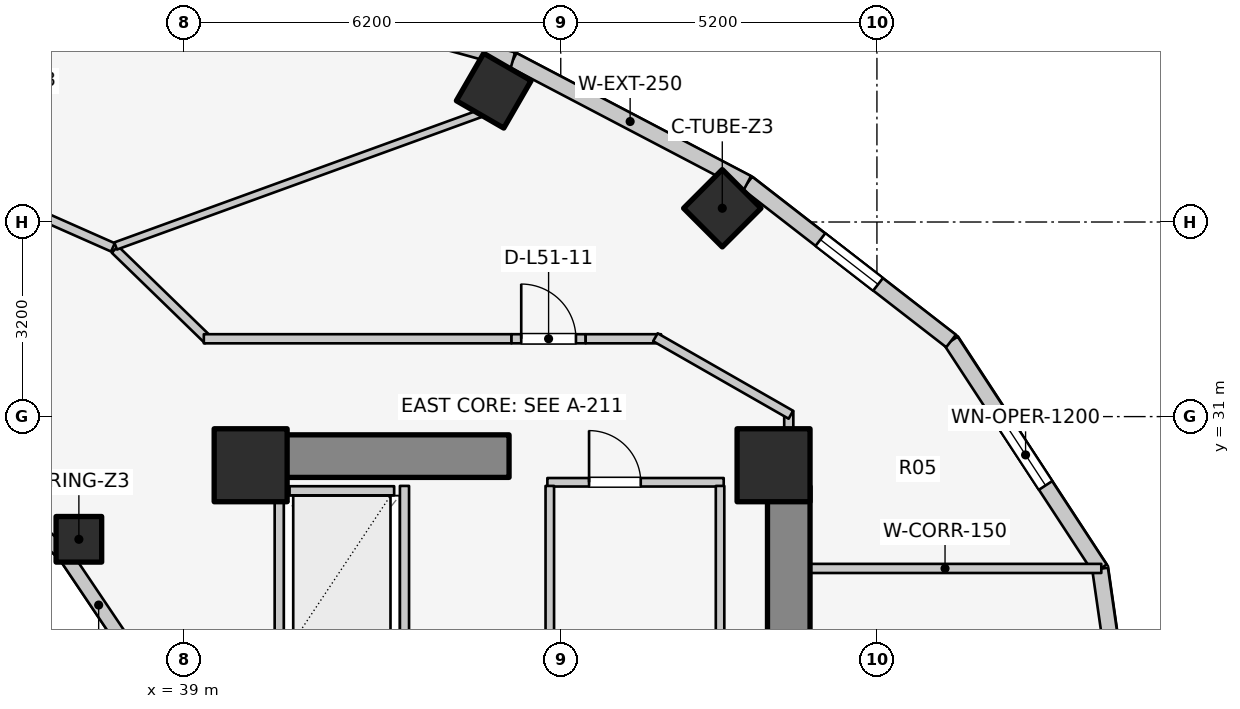
"""IFC4 building model, lengths in metres.
Left out: names, types, materials, properties, quantities, classifications, styles, units other than length and angle.
Written with IfcOpenShell. Run it as: python <this file> out.ifc"""

import sys

from ifc_helpers import new_model, si_unit, direction, frame, frame_2d, origin, origin_2d, place, context, subcontext, project, spatial, rectangle, extrude, element, fill, save


model = new_model("IFC4")
c1 = context("Model", 3, precision=1e-05, world=origin(), true_north=direction((0.0, 1.0)))
c2 = subcontext(c1, "Body", "Model", "MODEL_VIEW")
j1 = project(units=[si_unit("LENGTHUNIT", "METRE"), si_unit("PLANEANGLEUNIT", "RADIAN")], contexts=[c1])
p1 = place(None, origin())
s1 = spatial("IfcSite", under=j1, at=p1, CompositionType="ELEMENT")
p2 = place(p1, origin())
s2 = spatial("IfcBuilding", under=s1, at=p2, CompositionType="ELEMENT")
p3 = place(p2, frame((0.0, 0.0, 168.4)))
s3 = spatial("IfcBuildingStorey", under=s2, at=p3, CompositionType="ELEMENT", Elevation=168.4)
p4 = place(p3, frame((48.95, 17.05, 0.0), z_axis=(0.0, 0.0, 1.0), x_axis=(0.0, 1.0, 0.0)))
e1 = element("IfcWall", 1, at=p4, inside=s3, PredefinedType="SHEAR", context=c2, shape_type="SweptSolid", body=[
    extrude(rectangle(XDim=12.8, YDim=0.7, at=frame_2d((6.4, 0.0))), origin(), (0.0, 0.0, 1.0), 3.1),
])
p5 = place(p3, frame((39.85, 30.35, 0.0), z_axis=(0.0, 0.0, 1.0), x_axis=(1.0, 0.0, 0.0)))
e2 = element("IfcWall", 2, at=p5, inside=s3, PredefinedType="SHEAR", context=c2, shape_type="SweptSolid", body=[
    extrude(rectangle(XDim=4.5, YDim=0.7, at=frame_2d((2.25, 0.0))), origin(), (0.0, 0.0, 1.0), 3.1),
])
for number, where, z_axis, x_axis in (
    (3, (48.7, 30.2, 0.0), (0.0, 0.0, 1.0), (1.0, 0.0, 0.0)),
    (4, (40.1, 30.2, 0.0), (0.0, 0.0, 1.0), (1.0, 0.0, 0.0)),
):
    element("IfcColumn", number, at=place(p3, frame(where, z_axis=z_axis, x_axis=x_axis)), inside=s3, PredefinedType="COLUMN", context=c2, shape_type="SweptSolid", body=[
        extrude(rectangle(XDim=1.2, YDim=1.2, at=origin_2d()), origin(), (0.0, 0.0, 1.0), 3.1),
    ])
p6 = place(p3, frame((37.275, 28.982, 0.0), z_axis=(0.0, 0.0, 1.0), x_axis=(1.0, 0.0, 0.0)))
e5 = element("IfcColumn", 5, at=p6, inside=s3, PredefinedType="COLUMN", context=c2, shape_type="SweptSolid", body=[
    extrude(rectangle(XDim=0.75, YDim=0.75, at=origin_2d()), origin(), (0.0, 0.0, 1.0), 3.1),
])
for number, where, z_axis, x_axis in (
    (6, (47.857, 34.427, 0.0), (0.0, 0.0, 1.0), (0.707, 0.707, 0.0)),
    (7, (44.098, 36.359, 0.0), (0.0, 0.0, 1.0), (0.5, 0.866, 0.0)),
):
    element("IfcColumn", number, at=place(p3, frame(where, z_axis=z_axis, x_axis=x_axis)), inside=s3, PredefinedType="COLUMN", context=c2, shape_type="SweptSolid", body=[
        extrude(rectangle(XDim=0.9, YDim=0.9, at=origin_2d()), origin(), (0.0, 0.0, 1.0), 3.1),
    ])
p7 = place(p3, frame((38.166, 27.06, 0.0), z_axis=(0.0, 0.0, 1.0), x_axis=(-0.558197800898, 0.829707909492, 0.0)))
e8 = element("IfcWall", 8, at=p7, inside=s3, PredefinedType="STANDARD", context=c2, shape_type="SweptSolid", body=[
    extrude(rectangle(XDim=2.027, YDim=0.23, at=frame_2d((1.013, 0.0))), origin(), (0.0, 0.0, 1.0), 1.22),
])
p8 = place(p3, frame((37.035, 28.742, 0.0), z_axis=(0.0, 0.0, 1.0), x_axis=(-0.752576694707, 0.658504607869, 0.0)))
e9 = element("IfcWall", 9, at=p8, inside=s3, PredefinedType="STANDARD", context=c2, shape_type="SweptSolid", body=[
    extrude(rectangle(XDim=1.959, YDim=0.23, at=frame_2d((0.98, 0.0))), origin(), (0.0, 0.0, 1.0), 1.22),
])
p9 = place(p3, frame((54.86, 23.0, 0.0), z_axis=(0.0, 0.0, 1.0), x_axis=(-0.142227632286, 0.989833976288, 0.0)))
e10 = element("IfcWall", 10, at=p9, inside=s3, PredefinedType="STANDARD", context=c2, shape_type="SweptSolid", body=[
    extrude(rectangle(XDim=5.553, YDim=0.26, at=frame_2d((2.776, 0.0))), origin(), (0.0, 0.0, 1.0), 2.57),
])
p10 = place(p9, frame((2.027, 0.0, 0.75)))
e11 = element("IfcOpeningElement", 11, at=p10, cuts=e10, PredefinedType="OPENING", context=c2, shape_type="SweptSolid", body=[
    extrude(rectangle(XDim=1.5, YDim=1.6, at=frame_2d((0.75, 0.8))), frame((0.0, 0.14, 0.0), z_axis=(0.0, -1.0, 0.0), x_axis=(1.0, 0.0, 0.0)), (0.0, 0.0, 1.0), 0.28),
])
p11 = place(p3, frame((54.07, 28.497, 0.0), z_axis=(0.0, 0.0, 1.0), x_axis=(-0.547456494366, 0.836834145322, 0.0)))
e12 = element("IfcWall", 12, at=p11, inside=s3, PredefinedType="STANDARD", context=c2, shape_type="SweptSolid", body=[
    extrude(rectangle(XDim=4.477, YDim=0.26, at=frame_2d((2.239, 0.0))), origin(), (0.0, 0.0, 1.0), 1.22),
])
p12 = place(p11, frame((1.639, 0.0, 0.15)))
e13 = element("IfcOpeningElement", 13, at=p12, cuts=e12, PredefinedType="OPENING", context=c2, shape_type="SweptSolid", body=[
    extrude(rectangle(XDim=1.2, YDim=0.9, at=frame_2d((0.6, 0.45))), frame((0.0, 0.14, 0.0), z_axis=(0.0, -1.0, 0.0), x_axis=(1.0, 0.0, 0.0)), (0.0, 0.0, 1.0), 0.28),
])
p13 = place(p3, frame((51.619, 32.243, 0.0), z_axis=(0.0, 0.0, 1.0), x_axis=(-0.790185650662, 0.612867552973, 0.0)))
e14 = element("IfcWall", 14, at=p13, inside=s3, PredefinedType="STANDARD", context=c2, shape_type="SweptSolid", body=[
    extrude(rectangle(XDim=4.239, YDim=0.26, at=frame_2d((2.12, 0.0))), origin(), (0.0, 0.0, 1.0), 1.22),
])
p14 = place(p13, frame((1.52, 0.0, 0.15)))
e15 = element("IfcOpeningElement", 15, at=p14, cuts=e14, PredefinedType="OPENING", context=c2, shape_type="SweptSolid", body=[
    extrude(rectangle(XDim=1.2, YDim=0.9, at=frame_2d((0.6, 0.45))), frame((0.0, 0.14, 0.0), z_axis=(0.0, -1.0, 0.0), x_axis=(1.0, 0.0, 0.0)), (0.0, 0.0, 1.0), 0.28),
])
p15 = place(p3, frame((48.269, 34.842, 0.0), z_axis=(0.0, 0.0, 1.0), x_axis=(-0.885660265226, 0.464333818065, 0.0)))
e16 = element("IfcWall", 16, at=p15, inside=s3, PredefinedType="STANDARD", context=c2, shape_type="SweptSolid", body=[
    extrude(rectangle(XDim=4.354, YDim=0.26, at=frame_2d((2.177, 0.0))), origin(), (0.0, 0.0, 1.0), 1.22),
])
p16 = place(p3, frame((44.413, 36.863, 0.0), z_axis=(0.0, 0.0, 1.0), x_axis=(-0.963953455704, 0.26607092144, 0.0)))
e17 = element("IfcWall", 17, at=p16, inside=s3, PredefinedType="STANDARD", context=c2, shape_type="SweptSolid", body=[
    extrude(rectangle(XDim=5.237, YDim=0.26, at=frame_2d((2.618, 0.0))), origin(), (0.0, 0.0, 1.0), 1.22),
])
p17 = place(p16, frame((2.018, 0.0, 0.15)))
e18 = element("IfcOpeningElement", 18, at=p17, cuts=e17, PredefinedType="OPENING", context=c2, shape_type="SweptSolid", body=[
    extrude(rectangle(XDim=1.2, YDim=0.9, at=frame_2d((0.6, 0.45))), frame((0.0, 0.14, 0.0), z_axis=(0.0, -1.0, 0.0), x_axis=(1.0, 0.0, 0.0)), (0.0, 0.0, 1.0), 0.28),
])
p18 = place(p3, frame((40.74, 29.78, 0.0), z_axis=(0.0, 0.0, 1.0), x_axis=(1.0, 0.0, 0.0)))
e19 = element("IfcWall", 19, at=p18, inside=s3, PredefinedType="SOLIDWALL", context=c2, shape_type="SweptSolid", body=[
    extrude(rectangle(XDim=1.72, YDim=0.15, at=frame_2d((0.86, 0.0))), origin(), (0.0, 0.0, 1.0), 2.575),
])
for number, where, z_axis, x_axis in (
    (20, (40.57, 27.14, 0.0), (0.0, 0.0, 1.0), (0.0, 1.0, 0.0)),
    (21, (42.63, 27.14, 0.0), (0.0, 0.0, 1.0), (0.0, 1.0, 0.0)),
):
    element("IfcWall", number, at=place(p3, frame(where, z_axis=z_axis, x_axis=x_axis)), inside=s3, PredefinedType="SOLIDWALL", context=c2, shape_type="SweptSolid", body=[
        extrude(rectangle(XDim=2.72, YDim=0.15, at=frame_2d((1.36, 0.0))), origin(), (0.0, 0.0, 1.0), 2.575),
    ])
p19 = place(p3, frame((44.98, 29.92, 0.0), z_axis=(0.0, 0.0, 1.0), x_axis=(1.0, 0.0, 0.0)))
e22 = element("IfcWall", 22, at=p19, inside=s3, PredefinedType="PLUMBINGWALL", context=c2, shape_type="SweptSolid", body=[
    extrude(rectangle(XDim=2.9, YDim=0.14, at=frame_2d((1.45, 0.0))), origin(), (0.0, 0.0, 1.0), 2.575),
])
p20 = place(p19, frame((0.686, 0.0, 0.0)))
e23 = element("IfcOpeningElement", 23, at=p20, cuts=e22, PredefinedType="OPENING", context=c2, shape_type="SweptSolid", body=[
    extrude(rectangle(XDim=0.85, YDim=2.05, at=frame_2d((0.425, 1.025))), frame((0.0, 0.08, 0.0), z_axis=(0.0, -1.0, 0.0), x_axis=(1.0, 0.0, 0.0)), (0.0, 0.0, 1.0), 0.16),
])
for number, where, z_axis, x_axis in (
    (24, (45.02, 25.98, 0.0), (0.0, 0.0, 1.0), (0.0, 1.0, 0.0)),
    (25, (47.82, 25.98, 0.0), (0.0, 0.0, 1.0), (0.0, 1.0, 0.0)),
):
    element("IfcWall", number, at=place(p3, frame(where, z_axis=z_axis, x_axis=x_axis)), inside=s3, PredefinedType="PLUMBINGWALL", context=c2, shape_type="SweptSolid", body=[
        extrude(rectangle(XDim=3.88, YDim=0.14, at=frame_2d((1.94, 0.0))), origin(), (0.0, 0.0, 1.0), 2.575),
    ])
p21 = place(p3, frame((48.95, 28.503, 0.0), z_axis=(0.0, 0.0, 1.0), x_axis=(1.0, 0.0, 0.0)))
e26 = element("IfcWall", 26, at=p21, inside=s3, PredefinedType="PARTITIONING", context=c2, shape_type="SweptSolid", body=[
    extrude(rectangle(XDim=5.14, YDim=0.15, at=frame_2d((2.57, 0.0))), origin(), (0.0, 0.0, 1.0), 2.575),
])
p22 = place(p3, frame((48.95, 29.8, 0.0), z_axis=(0.0, 0.0, 1.0), x_axis=(0.0, 1.0, 0.0)))
e27 = element("IfcWall", 27, at=p22, inside=s3, PredefinedType="PARTITIONING", context=c2, shape_type="SweptSolid", body=[
    extrude(rectangle(XDim=1.29, YDim=0.15, at=frame_2d((0.645, 0.0))), origin(), (0.0, 0.0, 1.0), 1.22),
])
p23 = place(p3, frame((37.867, 33.749, 0.0), z_axis=(0.0, 0.0, 1.0), x_axis=(0.717419568599, -0.696641344302, 0.0)))
e28 = element("IfcWall", 28, at=p23, inside=s3, PredefinedType="PARTITIONING", context=c2, shape_type="SweptSolid", body=[
    extrude(rectangle(XDim=2.138, YDim=0.15, at=frame_2d((1.069, 0.0))), origin(), (0.0, 0.0, 1.0), 2.019),
])
p24 = place(p3, frame((39.33, 32.28, 0.0), z_axis=(0.0, 0.0, 1.0), x_axis=(1.0, 0.0, 0.0)))
e29 = element("IfcWall", 29, at=p24, inside=s3, PredefinedType="PARTITIONING", context=c2, shape_type="SweptSolid", body=[
    extrude(rectangle(XDim=5.06, YDim=0.15, at=frame_2d((2.53, 0.0))), origin(), (0.0, 0.0, 1.0), 2.019),
])
p25 = place(p3, frame((44.39, 32.28, 0.0), z_axis=(0.0, 0.0, 1.0), x_axis=(1.0, 0.0, 0.0)))
e30 = element("IfcWall", 30, at=p25, inside=s3, PredefinedType="PARTITIONING", context=c2, shape_type="SweptSolid", body=[
    extrude(rectangle(XDim=1.22, YDim=0.15, at=frame_2d((0.61, 0.0))), origin(), (0.0, 0.0, 1.0), 2.16),
])
p26 = place(p25, frame((0.16, 0.0, 0.0)))
e31 = element("IfcOpeningElement", 31, at=p26, cuts=e30, PredefinedType="OPENING", context=c2, shape_type="SweptSolid", body=[
    extrude(rectangle(XDim=0.9, YDim=2.1, at=frame_2d((0.45, 1.05))), frame((0.0, 0.085, 0.0), z_axis=(0.0, -1.0, 0.0), x_axis=(1.0, 0.0, 0.0)), (0.0, 0.0, 1.0), 0.17),
])
p27 = place(p3, frame((45.61, 32.28, 0.0), z_axis=(0.0, 0.0, 1.0), x_axis=(1.0, 0.0, 0.0)))
e32 = element("IfcWall", 32, at=p27, inside=s3, PredefinedType="PARTITIONING", context=c2, shape_type="SweptSolid", body=[
    extrude(rectangle(XDim=1.24, YDim=0.15, at=frame_2d((0.62, 0.0))), origin(), (0.0, 0.0, 1.0), 2.575),
])
p28 = place(p3, frame((46.757, 32.305, 0.0), z_axis=(0.0, 0.0, 1.0), x_axis=(0.867991349648, -0.496579315857, 0.0)))
e33 = element("IfcWall", 33, at=p28, inside=s3, PredefinedType="PARTITIONING", context=c2, shape_type="SweptSolid", body=[
    extrude(rectangle(XDim=2.567, YDim=0.15, at=frame_2d((1.283, 0.0))), origin(), (0.0, 0.0, 1.0), 1.22),
])
p29 = place(p3, frame((37.88, 33.806, 0.0), z_axis=(0.0, 0.0, 1.0), x_axis=(0.939901628116, 0.341445353557, 0.0)))
e34 = element("IfcWall", 34, at=p29, inside=s3, PredefinedType="PARTITIONING", context=c2, shape_type="SweptSolid", body=[
    extrude(rectangle(XDim=6.387, YDim=0.125, at=frame_2d((3.194, 0.0))), origin(), (0.0, 0.0, 1.0), 1.22),
])
p30 = place(p3, frame((37.835, 33.783, 0.0), z_axis=(0.0, 0.0, 1.0), x_axis=(-0.91445214467, 0.404694051239, 0.0)))
e35 = element("IfcWall", 35, at=p30, inside=s3, PredefinedType="PARTITIONING", context=c2, shape_type="SweptSolid", body=[
    extrude(rectangle(XDim=3.091, YDim=0.15, at=frame_2d((1.545, 0.0))), origin(), (0.0, 0.0, 1.0), 2.019),
])
p31 = place(p12, origin())
e36 = element("IfcWindow", 36, at=p31, inside=s3, PartitioningType="SINGLE_PANEL", PredefinedType="WINDOW", context=c2, shape_type="SweptSolid", body=[
    extrude(rectangle(XDim=1.2, YDim=0.9, at=frame_2d((0.6, 0.45))), frame((0.0, 0.03, 0.0), z_axis=(0.0, -1.0, 0.0), x_axis=(1.0, 0.0, 0.0)), (0.0, 0.0, 1.0), 0.06),
])
fill(e13, e36)
p32 = place(p14, origin())
e37 = element("IfcWindow", 37, at=p32, inside=s3, PartitioningType="SINGLE_PANEL", PredefinedType="WINDOW", context=c2, shape_type="SweptSolid", body=[
    extrude(rectangle(XDim=1.2, YDim=0.9, at=frame_2d((0.6, 0.45))), frame((0.0, 0.03, 0.0), z_axis=(0.0, -1.0, 0.0), x_axis=(1.0, 0.0, 0.0)), (0.0, 0.0, 1.0), 0.06),
])
fill(e15, e37)
p33 = place(p20, origin())
e38 = element("IfcDoor", 38, at=p33, inside=s3, OperationType="SINGLE_SWING_LEFT", PredefinedType="DOOR", context=c2, shape_type="SweptSolid", body=[
    extrude(rectangle(XDim=0.85, YDim=2.05, at=frame_2d((0.425, 1.025))), frame((0.0, 0.025, 0.0), z_axis=(0.0, -1.0, 0.0), x_axis=(1.0, 0.0, 0.0)), (0.0, 0.0, 1.0), 0.05),
])
fill(e23, e38)
p34 = place(p26, origin())
e39 = element("IfcDoor", 39, at=p34, inside=s3, OperationType="SINGLE_SWING_LEFT", PredefinedType="DOOR", context=c2, shape_type="SweptSolid", body=[
    extrude(rectangle(XDim=0.9, YDim=2.1, at=frame_2d((0.45, 1.05))), frame((0.0, 0.025, 0.0), z_axis=(0.0, -1.0, 0.0), x_axis=(1.0, 0.0, 0.0)), (0.0, 0.0, 1.0), 0.05),
])
fill(e31, e39)
save(model, sys.argv[1])
